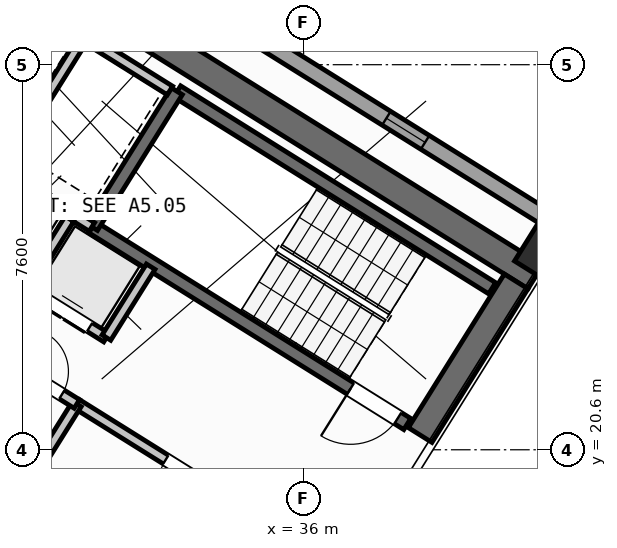
"""IFC4 building model, lengths in metres.
Left out: names, types, materials, properties, quantities, classifications, styles, units other than length and angle.
Written with IfcOpenShell. Run it as: python <this file> out.ifc"""

import sys

from ifc_helpers import new_model, si_unit, direction, frame, frame_2d, origin, origin_2d, place, context, subcontext, project, spatial, rectangle, hollow_rectangle, extrude, source, transform, mapped, element, fill, save


model = new_model("IFC4")
c1 = context("Model", 3, precision=1e-05, world=origin(), true_north=direction((0.0, 1.0)))
c2 = subcontext(c1, "Body", "Model", "MODEL_VIEW")
j1 = project(units=[si_unit("LENGTHUNIT", "METRE"), si_unit("PLANEANGLEUNIT", "RADIAN")], contexts=[c1])
p1 = place(None, origin())
s1 = spatial("IfcSite", under=j1, at=p1, CompositionType="ELEMENT")
p2 = place(p1, origin())
s2 = spatial("IfcBuilding", under=s1, at=p2, CompositionType="ELEMENT")
p3 = place(p2, frame((0.0, 0.0, 132.6)))
s3 = spatial("IfcBuildingStorey", under=s2, at=p3, CompositionType="ELEMENT", Elevation=132.6)
p4 = place(p3, frame((40.573, 24.01, 0.0), z_axis=(0.0, 0.0, 1.0), x_axis=(-0.848047359947, 0.529920442413, 0.0)))
e1 = element("IfcWall", 1, at=p4, inside=s3, PredefinedType="SHEAR", context=c2, shape_type="SweptSolid", body=[
    extrude(rectangle(XDim=13.14, YDim=0.55, at=frame_2d((6.57, 0.0))), origin(), (0.0, 0.0, 1.0), 3.32),
])
p5 = place(p3, frame((40.194, 23.922, 0.0), z_axis=(0.0, 0.0, 1.0), x_axis=(-0.529888438328, -0.848067357541, 0.0)))
e2 = element("IfcWall", 2, at=p5, inside=s3, PredefinedType="SHEAR", context=c2, shape_type="SweptSolid", body=[
    extrude(rectangle(XDim=3.575, YDim=0.55, at=frame_2d((1.788, 0.0))), origin(), (0.0, 0.0, 1.0), 3.32),
])
m1 = source(origin(), c2, "Body", "SweptSolid", [
    extrude(hollow_rectangle(XDim=0.9, YDim=0.9, WallThickness=0.036, at=origin_2d()), origin(), (0.0, 0.0, 1.0), 3.6),
])
p6 = place(p3, frame((40.783, 24.469, 0.0), z_axis=(0.0, 0.0, 1.0), x_axis=(-0.848048096156, 0.529919264233, 0.0)))
e3 = element("IfcColumn", 3, at=p6, inside=s3, PredefinedType="COLUMN", context=c2, shape_type="MappedRepresentation", body=[
    mapped(m1, transform((0.0, 0.0, 0.0), scale=1.0)),
])
p7 = place(p3, frame((14.138, 41.825, 0.0), z_axis=(0.0, 0.0, 1.0), x_axis=(0.848046498049, -0.529921821731, 0.0)))
e4 = element("IfcWall", 4, at=p7, inside=s3, PredefinedType="STANDARD", context=c2, shape_type="SweptSolid", body=[
    extrude(rectangle(XDim=31.588, YDim=0.32, at=frame_2d((15.794, 0.0))), origin(), (0.0, 0.0, 1.0), 3.32),
])
p8 = place(p7, frame((3.253, 0.0, 0.0)))
e5 = element("IfcOpeningElement", 5, at=p8, cuts=e4, PredefinedType="OPENING", context=c2, shape_type="SweptSolid", body=[
    extrude(rectangle(XDim=1.05, YDim=2.15, at=frame_2d((0.525, 1.075))), frame((0.0, 0.17, 0.0), z_axis=(0.0, -1.0, 0.0), x_axis=(1.0, 0.0, 0.0)), (0.0, 0.0, 1.0), 0.34),
])
p9 = place(p7, frame((0.863, 0.0, 0.85)))
e6 = element("IfcOpeningElement", 6, at=p9, cuts=e4, PredefinedType="OPENING", context=c2, shape_type="SweptSolid", body=[
    extrude(rectangle(XDim=1.8, YDim=1.5, at=frame_2d((0.9, 0.75))), frame((0.0, 0.17, 0.0), z_axis=(0.0, -1.0, 0.0), x_axis=(1.0, 0.0, 0.0)), (0.0, 0.0, 1.0), 0.34),
])
p10 = place(p7, frame((8.435, 0.0, 0.85)))
e7 = element("IfcOpeningElement", 7, at=p10, cuts=e4, PredefinedType="OPENING", context=c2, shape_type="SweptSolid", body=[
    extrude(rectangle(XDim=1.8, YDim=1.5, at=frame_2d((0.9, 0.75))), frame((0.0, 0.17, 0.0), z_axis=(0.0, -1.0, 0.0), x_axis=(1.0, 0.0, 0.0)), (0.0, 0.0, 1.0), 0.34),
])
p11 = place(p7, frame((13.874, 0.0, 0.85)))
e8 = element("IfcOpeningElement", 8, at=p11, cuts=e4, PredefinedType="OPENING", context=c2, shape_type="SweptSolid", body=[
    extrude(rectangle(XDim=1.5, YDim=1.5, at=frame_2d((0.75, 0.75))), frame((0.0, 0.17, 0.0), z_axis=(0.0, -1.0, 0.0), x_axis=(1.0, 0.0, 0.0)), (0.0, 0.0, 1.0), 0.34),
])
p12 = place(p7, frame((17.104, 0.0, 1.0)))
e9 = element("IfcOpeningElement", 9, at=p12, cuts=e4, PredefinedType="OPENING", context=c2, shape_type="SweptSolid", body=[
    extrude(rectangle(XDim=0.9, YDim=1.25, at=frame_2d((0.45, 0.625))), frame((0.0, 0.17, 0.0), z_axis=(0.0, -1.0, 0.0), x_axis=(1.0, 0.0, 0.0)), (0.0, 0.0, 1.0), 0.34),
])
p13 = place(p7, frame((22.131, 0.0, 1.0)))
e10 = element("IfcOpeningElement", 10, at=p13, cuts=e4, PredefinedType="OPENING", context=c2, shape_type="SweptSolid", body=[
    extrude(rectangle(XDim=0.9, YDim=1.25, at=frame_2d((0.45, 0.625))), frame((0.0, 0.17, 0.0), z_axis=(0.0, -1.0, 0.0), x_axis=(1.0, 0.0, 0.0)), (0.0, 0.0, 1.0), 0.34),
])
p14 = place(p7, frame((27.706, 0.0, 1.0)))
e11 = element("IfcOpeningElement", 11, at=p14, cuts=e4, PredefinedType="OPENING", context=c2, shape_type="SweptSolid", body=[
    extrude(rectangle(XDim=0.9, YDim=1.25, at=frame_2d((0.45, 0.625))), frame((0.0, 0.17, 0.0), z_axis=(0.0, -1.0, 0.0), x_axis=(1.0, 0.0, 0.0)), (0.0, 0.0, 1.0), 0.34),
])
p15 = place(p3, frame((31.28, 18.261, 0.0), z_axis=(0.0, 0.0, 1.0), x_axis=(-0.848051618787, 0.529913626805, 0.0)))
e12 = element("IfcWall", 12, at=p15, inside=s3, PredefinedType="SHEAR", context=c2, shape_type="SweptSolid", body=[
    extrude(rectangle(XDim=7.46, YDim=0.26, at=frame_2d((3.73, 0.0))), origin(), (0.0, 0.0, 1.0), 3.32),
])
p16 = place(p15, frame((0.36, 0.0, 0.0)))
e13 = element("IfcOpeningElement", 13, at=p16, cuts=e12, PredefinedType="OPENING", context=c2, shape_type="SweptSolid", body=[
    extrude(rectangle(XDim=0.86, YDim=2.05, at=frame_2d((0.43, 1.025))), frame((0.0, 0.14, 0.0), z_axis=(0.0, -1.0, 0.0), x_axis=(1.0, 0.0, 0.0)), (0.0, 0.0, 1.0), 0.28),
])
p17 = place(p3, frame((39.721, 23.788, 0.0), z_axis=(0.0, 0.0, 1.0), x_axis=(-0.848054434086, 0.529909121291, 0.0)))
e14 = element("IfcWall", 14, at=p17, inside=s3, PredefinedType="SHEAR", context=c2, shape_type="SweptSolid", body=[
    extrude(rectangle(XDim=7.33, YDim=0.26, at=frame_2d((3.665, 0.0))), origin(), (0.0, 0.0, 1.0), 3.32),
])
p18 = place(p3, frame((38.046, 21.108, 0.0), z_axis=(0.0, 0.0, 1.0), x_axis=(-0.848054434086, 0.529909121291, 0.0)))
e15 = element("IfcWall", 15, at=p18, inside=s3, PredefinedType="SHEAR", context=c2, shape_type="SweptSolid", body=[
    extrude(rectangle(XDim=7.33, YDim=0.26, at=frame_2d((3.665, 0.0))), origin(), (0.0, 0.0, 1.0), 3.32),
])
p19 = place(p18, frame((0.22, 0.0, 0.0)))
e16 = element("IfcOpeningElement", 16, at=p19, cuts=e15, PredefinedType="OPENING", context=c2, shape_type="SweptSolid", body=[
    extrude(rectangle(XDim=1.1, YDim=2.1, at=frame_2d((0.55, 1.05))), frame((0.0, 0.14, 0.0), z_axis=(0.0, -1.0, 0.0), x_axis=(1.0, 0.0, 0.0)), (0.0, 0.0, 1.0), 0.28),
])
p20 = place(p3, frame((33.496, 27.677, 0.0), z_axis=(0.0, 0.0, 1.0), x_axis=(-0.529908658664, -0.84805472316, 0.0)))
e17 = element("IfcWall", 17, at=p20, inside=s3, PredefinedType="SHEAR", context=c2, shape_type="SweptSolid", body=[
    extrude(rectangle(XDim=3.16, YDim=0.26, at=frame_2d((1.58, 0.0))), origin(), (0.0, 0.0, 1.0), 3.32),
])
p21 = place(p3, frame((36.417, 18.447, 0.0), z_axis=(0.0, 0.0, 1.0), x_axis=(-0.848064879198, 0.529892404805, 0.0)))
e18 = element("IfcWall", 18, at=p21, inside=s3, PredefinedType="STANDARD", context=c2, shape_type="SweptSolid", body=[
    extrude(rectangle(XDim=5.768, YDim=0.2, at=frame_2d((2.884, 0.0))), origin(), (0.0, 0.0, 1.0), 3.31),
])
p22 = place(p21, frame((2.548, 0.0, 0.0)))
e19 = element("IfcOpeningElement", 19, at=p22, cuts=e18, PredefinedType="OPENING", context=c2, shape_type="SweptSolid", body=[
    extrude(rectangle(XDim=1.15, YDim=2.1, at=frame_2d((0.575, 1.05))), frame((0.0, 0.11, 0.0), z_axis=(0.0, -1.0, 0.0), x_axis=(1.0, 0.0, 0.0)), (0.0, 0.0, 1.0), 0.22),
])
p23 = place(p3, frame((31.822, 24.998, 0.0), z_axis=(0.0, 0.0, 1.0), x_axis=(-0.848036912365, 0.52993716162, 0.0)))
e20 = element("IfcWall", 20, at=p23, inside=s3, PredefinedType="STANDARD", context=c2, shape_type="SweptSolid", body=[
    extrude(rectangle(XDim=4.618, YDim=0.2, at=frame_2d((2.309, 0.0))), origin(), (0.0, 0.0, 1.0), 3.31),
])
p24 = place(p3, frame((32.108, 22.814, 0.0), z_axis=(0.0, 0.0, 1.0), x_axis=(-0.848042229521, 0.529928652696, 0.0)))
e21 = element("IfcWall", 21, at=p24, inside=s3, PredefinedType="STANDARD", context=c2, shape_type="SweptSolid", body=[
    extrude(rectangle(XDim=5.62, YDim=0.2, at=frame_2d((2.81, 0.0))), origin(), (0.0, 0.0, 1.0), 3.31),
])
p25 = place(p24, frame((0.39, 0.0, 0.0)))
e22 = element("IfcOpeningElement", 22, at=p25, cuts=e21, PredefinedType="OPENING", context=c2, shape_type="SweptSolid", body=[
    extrude(rectangle(XDim=1.1, YDim=2.15, at=frame_2d((0.55, 1.075))), frame((0.0, 0.11, 0.0), z_axis=(0.0, -1.0, 0.0), x_axis=(1.0, 0.0, 0.0)), (0.0, 0.0, 1.0), 0.22),
])
p26 = place(p24, frame((2.25, 0.0, 0.0)))
e23 = element("IfcOpeningElement", 23, at=p26, cuts=e21, PredefinedType="OPENING", context=c2, shape_type="SweptSolid", body=[
    extrude(rectangle(XDim=1.1, YDim=2.15, at=frame_2d((0.55, 1.075))), frame((0.0, 0.11, 0.0), z_axis=(0.0, -1.0, 0.0), x_axis=(1.0, 0.0, 0.0)), (0.0, 0.0, 1.0), 0.22),
])
p27 = place(p24, frame((4.11, 0.0, 0.0)))
e24 = element("IfcOpeningElement", 24, at=p27, cuts=e21, PredefinedType="OPENING", context=c2, shape_type="SweptSolid", body=[
    extrude(rectangle(XDim=1.1, YDim=2.15, at=frame_2d((0.55, 1.075))), frame((0.0, 0.11, 0.0), z_axis=(0.0, -1.0, 0.0), x_axis=(1.0, 0.0, 0.0)), (0.0, 0.0, 1.0), 0.22),
])
p28 = place(p3, frame((32.982, 24.213, 0.0), z_axis=(0.0, 0.0, 1.0), x_axis=(-0.529839334948, -0.84809803628, 0.0)))
e25 = element("IfcWall", 25, at=p28, inside=s3, PredefinedType="STANDARD", context=c2, shape_type="SweptSolid", body=[
    extrude(rectangle(XDim=1.65, YDim=0.2, at=frame_2d((0.825, 0.0))), origin(), (0.0, 0.0, 1.0), 3.31),
])
p29 = place(p3, frame((31.645, 28.716, 0.0), z_axis=(0.0, 0.0, 1.0), x_axis=(-0.52986693015, -0.848080795876, 0.0)))
e26 = element("IfcWall", 26, at=p29, inside=s3, PredefinedType="STANDARD", context=c2, shape_type="SweptSolid", body=[
    extrude(rectangle(XDim=2.66, YDim=0.2, at=frame_2d((1.33, 0.0))), origin(), (0.0, 0.0, 1.0), 3.31),
])
p30 = place(p3, frame((33.363, 27.69, 0.0), z_axis=(0.0, 0.0, 1.0), x_axis=(-0.848047090064, 0.529920874315, 0.0)))
e27 = element("IfcWall", 27, at=p30, inside=s3, PredefinedType="STANDARD", context=c2, shape_type="SweptSolid", body=[
    extrude(rectangle(XDim=4.498, YDim=0.2, at=frame_2d((2.249, 0.0))), origin(), (0.0, 0.0, 1.0), 3.31),
])
p31 = place(p3, frame((31.379, 25.156, 0.0), z_axis=(0.0, 0.0, 1.0), x_axis=(-0.529998940003, -0.847998304005, 0.0)))
e28 = element("IfcWall", 28, at=p31, inside=s3, PredefinedType="STANDARD", context=c2, shape_type="SweptSolid", body=[
    extrude(rectangle(XDim=1.58, YDim=0.2, at=frame_2d((0.79, 0.0))), origin(), (0.0, 0.0, 1.0), 3.31),
])
p32 = place(p3, frame((31.525, 21.504, 0.0), z_axis=(0.0, 0.0, 1.0), x_axis=(-0.529907497854, -0.848055448493, 0.0)))
e29 = element("IfcWall", 29, at=p32, inside=s3, PredefinedType="STANDARD", context=c2, shape_type="SweptSolid", body=[
    extrude(rectangle(XDim=2.88, YDim=0.2, at=frame_2d((1.44, 0.0))), origin(), (0.0, 0.0, 1.0), 3.31),
])
p33 = place(p3, frame((31.525, 21.504, 0.0), z_axis=(0.0, 0.0, 1.0), x_axis=(-0.848040211232, 0.529931882541, 0.0)))
e30 = element("IfcWall", 30, at=p33, inside=s3, PredefinedType="STANDARD", context=c2, shape_type="SweptSolid", body=[
    extrude(rectangle(XDim=6.218, YDim=0.2, at=frame_2d((3.109, 0.0))), origin(), (0.0, 0.0, 1.0), 3.31),
])
p34 = place(p33, frame((4.4, 0.0, 0.0)))
e31 = element("IfcOpeningElement", 31, at=p34, cuts=e30, PredefinedType="OPENING", context=c2, shape_type="SweptSolid", body=[
    extrude(rectangle(XDim=0.86, YDim=2.05, at=frame_2d((0.43, 1.025))), frame((0.0, 0.11, 0.0), z_axis=(0.0, -1.0, 0.0), x_axis=(1.0, 0.0, 0.0)), (0.0, 0.0, 1.0), 0.22),
])
p35 = place(p33, frame((0.35, 0.0, 0.0)))
e32 = element("IfcOpeningElement", 32, at=p35, cuts=e30, PredefinedType="OPENING", context=c2, shape_type="SweptSolid", body=[
    extrude(rectangle(XDim=0.86, YDim=2.05, at=frame_2d((0.43, 1.025))), frame((0.0, 0.11, 0.0), z_axis=(0.0, -1.0, 0.0), x_axis=(1.0, 0.0, 0.0)), (0.0, 0.0, 1.0), 0.22),
])
m2 = source(origin(), c2, "Body", "SweptSolid", [
    extrude(rectangle(XDim=0.9, YDim=1.25, at=frame_2d((0.45, 0.625))), frame((0.0, 0.03, 0.0), z_axis=(0.0, -1.0, 0.0), x_axis=(1.0, 0.0, 0.0)), (0.0, 0.0, 1.0), 0.06),
])
p36 = place(p14, origin())
e33 = element("IfcWindow", 33, at=p36, inside=s3, PartitioningType="SINGLE_PANEL", PredefinedType="WINDOW", context=c2, shape_type="MappedRepresentation", body=[
    mapped(m2, transform((0.0, 0.0, 0.0), scale=1.0)),
])
fill(e11, e33)
m3 = source(origin(), c2, "Body", "SweptSolid", [
    extrude(rectangle(XDim=1.1, YDim=2.1, at=frame_2d((0.55, 1.05))), frame((0.0, 0.025, 0.0), z_axis=(0.0, -1.0, 0.0), x_axis=(1.0, 0.0, 0.0)), (0.0, 0.0, 1.0), 0.05),
])
p37 = place(p19, origin())
e34 = element("IfcDoor", 34, at=p37, inside=s3, OperationType="SINGLE_SWING_RIGHT", PredefinedType="DOOR", context=c2, shape_type="MappedRepresentation", body=[
    mapped(m3, transform((0.0, 0.0, 0.0), scale=1.0)),
])
fill(e16, e34)
m4 = source(origin(), c2, "Body", "SweptSolid", [
    extrude(rectangle(XDim=1.15, YDim=2.1, at=frame_2d((0.575, 1.05))), frame((0.0, 0.025, 0.0), z_axis=(0.0, -1.0, 0.0), x_axis=(1.0, 0.0, 0.0)), (0.0, 0.0, 1.0), 0.05),
])
p38 = place(p22, origin())
e35 = element("IfcDoor", 35, at=p38, inside=s3, OperationType="SINGLE_SWING_LEFT", PredefinedType="DOOR", context=c2, shape_type="MappedRepresentation", body=[
    mapped(m4, transform((0.0, 0.0, 0.0), scale=1.0)),
])
fill(e19, e35)
m5 = source(origin(), c2, "Body", "SweptSolid", [
    extrude(rectangle(XDim=1.1, YDim=2.15, at=frame_2d((0.55, 1.075))), frame((0.0, 0.025, 0.0), z_axis=(0.0, -1.0, 0.0), x_axis=(1.0, 0.0, 0.0)), (0.0, 0.0, 1.0), 0.05),
])
p39 = place(p25, origin())
e36 = element("IfcDoor", 36, at=p39, inside=s3, OperationType="DOUBLE_DOOR_SLIDING", PredefinedType="DOOR", context=c2, shape_type="MappedRepresentation", body=[
    mapped(m5, transform((0.0, 0.0, 0.0), scale=1.0)),
])
fill(e22, e36)
m6 = source(origin(), c2, "Body", "SweptSolid", [
    extrude(rectangle(XDim=0.86, YDim=2.05, at=frame_2d((0.43, 1.025))), frame((0.0, 0.025, 0.0), z_axis=(0.0, -1.0, 0.0), x_axis=(1.0, 0.0, 0.0)), (0.0, 0.0, 1.0), 0.05),
])
p40 = place(p35, frame((0.86, 0.0, 0.0), z_axis=(0.0, 0.0, 1.0), x_axis=(-1.0, 0.0, 0.0)))
e37 = element("IfcDoor", 37, at=p40, inside=s3, OperationType="SINGLE_SWING_LEFT", PredefinedType="DOOR", context=c2, shape_type="MappedRepresentation", body=[
    mapped(m6, transform((0.0, 0.0, 0.0), scale=1.0)),
])
fill(e32, e37)
save(model, sys.argv[1])
